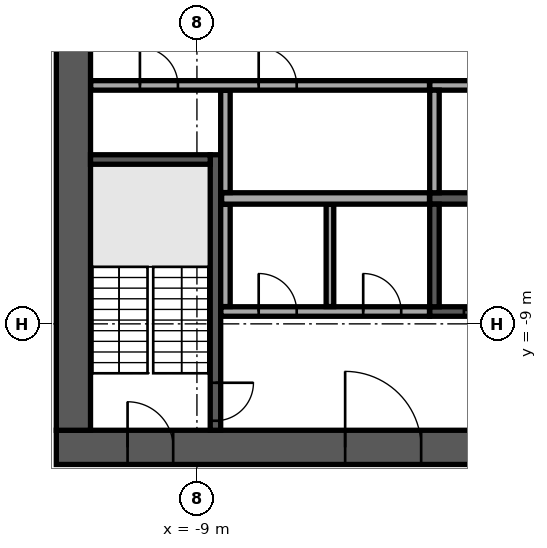
"""IFC4 building model, lengths in metres.
Left out: names, types, materials, properties, quantities, classifications, styles, units other than length and angle.
Written with IfcOpenShell. Run it as: python <this file> out.ifc"""

import sys

from ifc_helpers import new_model, si_unit, direction, frame, frame_2d, origin, place, context, subcontext, project, spatial, rectangle, extrude, element, fill, save


model = new_model("IFC4")
c1 = context("Model", 3, precision=1e-05, world=origin(), true_north=direction((0.0, 1.0)))
c2 = subcontext(c1, "Body", "Model", "MODEL_VIEW")
j1 = project(units=[si_unit("LENGTHUNIT", "METRE"), si_unit("PLANEANGLEUNIT", "RADIAN")], contexts=[c1])
p1 = place(None, origin())
s1 = spatial("IfcSite", under=j1, at=p1, CompositionType="ELEMENT")
p2 = place(p1, origin())
s2 = spatial("IfcBuilding", under=s1, at=p2, CompositionType="ELEMENT")
p3 = place(p2, frame((0.0, 0.0, 217.3)))
s3 = spatial("IfcBuildingStorey", under=s2, at=p3, CompositionType="ELEMENT", Elevation=217.3)
p4 = place(p3, frame((-12.7, -12.25, 0.0), z_axis=(0.0, 0.0, 1.0), x_axis=(1.0, 0.0, 0.0)))
e1 = element("IfcWall", 1, at=p4, inside=s3, PredefinedType="SHEAR", context=c2, shape_type="SweptSolid", body=[
    extrude(rectangle(XDim=25.4, YDim=0.9, at=frame_2d((12.7, 0.0))), origin(), (0.0, 0.0, 1.0), 3.62),
])
p5 = place(p4, frame((7.6, 0.0, 0.0)))
e2 = element("IfcOpeningElement", 2, at=p5, cuts=e1, PredefinedType="OPENING", context=c2, shape_type="SweptSolid", body=[
    extrude(rectangle(XDim=2.0, YDim=2.1, at=frame_2d((1.0, 1.05))), frame((0.0, 0.46, 0.0), z_axis=(0.0, -1.0, 0.0), x_axis=(1.0, 0.0, 0.0)), (0.0, 0.0, 1.0), 0.92),
])
p6 = place(p4, frame((17.725, 0.0, 0.0)))
e3 = element("IfcOpeningElement", 3, at=p6, cuts=e1, PredefinedType="OPENING", context=c2, shape_type="SweptSolid", body=[
    extrude(rectangle(XDim=1.2, YDim=2.1, at=frame_2d((0.6, 1.05))), frame((0.0, 0.46, 0.0), z_axis=(0.0, -1.0, 0.0), x_axis=(1.0, 0.0, 0.0)), (0.0, 0.0, 1.0), 0.92),
])
p7 = place(p4, frame((1.875, 0.0, 0.0)))
e4 = element("IfcOpeningElement", 4, at=p7, cuts=e1, PredefinedType="OPENING", context=c2, shape_type="SweptSolid", body=[
    extrude(rectangle(XDim=1.2, YDim=2.1, at=frame_2d((0.6, 1.05))), frame((0.0, 0.46, 0.0), z_axis=(0.0, -1.0, 0.0), x_axis=(1.0, 0.0, 0.0)), (0.0, 0.0, 1.0), 0.92),
])
p8 = place(p4, frame((22.325, 0.0, 0.0)))
e5 = element("IfcOpeningElement", 5, at=p8, cuts=e1, PredefinedType="OPENING", context=c2, shape_type="SweptSolid", body=[
    extrude(rectangle(XDim=1.2, YDim=2.1, at=frame_2d((0.6, 1.05))), frame((0.0, 0.46, 0.0), z_axis=(0.0, -1.0, 0.0), x_axis=(1.0, 0.0, 0.0)), (0.0, 0.0, 1.0), 0.92),
])
p9 = place(p3, frame((-12.25, -11.8, 0.0), z_axis=(0.0, 0.0, 1.0), x_axis=(0.0, 1.0, 0.0)))
e6 = element("IfcWall", 6, at=p9, inside=s3, PredefinedType="SHEAR", context=c2, shape_type="SweptSolid", body=[
    extrude(rectangle(XDim=23.6, YDim=0.9, at=frame_2d((11.8, 0.0))), origin(), (0.0, 0.0, 1.0), 3.62),
])
p10 = place(p9, frame((10.6, 0.0, 0.0)))
e7 = element("IfcOpeningElement", 7, at=p10, cuts=e6, PredefinedType="OPENING", context=c2, shape_type="SweptSolid", body=[
    extrude(rectangle(XDim=2.4, YDim=2.4, at=frame_2d((1.2, 1.2))), frame((0.0, 0.46, 0.0), z_axis=(0.0, -1.0, 0.0), x_axis=(1.0, 0.0, 0.0)), (0.0, 0.0, 1.0), 0.92),
])
p11 = place(p3, frame((-2.875, -5.7, 0.0), z_axis=(0.0, 0.0, 1.0), x_axis=(1.0, 0.0, 0.0)))
e8 = element("IfcWall", 8, at=p11, inside=s3, PredefinedType="SOLIDWALL", context=c2, shape_type="SweptSolid", body=[
    extrude(rectangle(XDim=11.25, YDim=0.3, at=frame_2d((5.625, 0.0))), origin(), (0.0, 0.0, 1.0), 3.62),
])
p12 = place(p3, frame((-2.875, -2.725, 0.0), z_axis=(0.0, 0.0, 1.0), x_axis=(1.0, 0.0, 0.0)))
e9 = element("IfcWall", 9, at=p12, inside=s3, PredefinedType="SOLIDWALL", context=c2, shape_type="SweptSolid", body=[
    extrude(rectangle(XDim=8.5, YDim=0.25, at=frame_2d((4.25, 0.0))), origin(), (0.0, 0.0, 1.0), 3.62),
])
p13 = place(p3, frame((-2.75, -5.55, 0.0), z_axis=(0.0, 0.0, 1.0), x_axis=(0.0, 1.0, 0.0)))
e10 = element("IfcWall", 10, at=p13, inside=s3, PredefinedType="SOLIDWALL", context=c2, shape_type="SweptSolid", body=[
    extrude(rectangle(XDim=2.7, YDim=0.25, at=frame_2d((1.35, 0.0))), origin(), (0.0, 0.0, 1.0), 3.62),
])
p14 = place(p3, frame((-2.875, -8.675, 0.0), z_axis=(0.0, 0.0, 1.0), x_axis=(1.0, 0.0, 0.0)))
e11 = element("IfcWall", 11, at=p14, inside=s3, PredefinedType="SOLIDWALL", context=c2, shape_type="SweptSolid", body=[
    extrude(rectangle(XDim=11.25, YDim=0.25, at=frame_2d((5.625, 0.0))), origin(), (0.0, 0.0, 1.0), 3.62),
])
p15 = place(p14, frame((0.9, 0.0, 0.0)))
e12 = element("IfcOpeningElement", 12, at=p15, cuts=e11, PredefinedType="OPENING", context=c2, shape_type="SweptSolid", body=[
    extrude(rectangle(XDim=1.2, YDim=2.1, at=frame_2d((0.6, 1.05))), frame((0.0, 0.135, 0.0), z_axis=(0.0, -1.0, 0.0), x_axis=(1.0, 0.0, 0.0)), (0.0, 0.0, 1.0), 0.27),
])
p16 = place(p14, frame((3.65, 0.0, 0.0)))
e13 = element("IfcOpeningElement", 13, at=p16, cuts=e11, PredefinedType="OPENING", context=c2, shape_type="SweptSolid", body=[
    extrude(rectangle(XDim=1.2, YDim=2.1, at=frame_2d((0.6, 1.05))), frame((0.0, 0.135, 0.0), z_axis=(0.0, -1.0, 0.0), x_axis=(1.0, 0.0, 0.0)), (0.0, 0.0, 1.0), 0.27),
])
p17 = place(p14, frame((6.4, 0.0, 0.0)))
e14 = element("IfcOpeningElement", 14, at=p17, cuts=e11, PredefinedType="OPENING", context=c2, shape_type="SweptSolid", body=[
    extrude(rectangle(XDim=1.2, YDim=2.1, at=frame_2d((0.6, 1.05))), frame((0.0, 0.135, 0.0), z_axis=(0.0, -1.0, 0.0), x_axis=(1.0, 0.0, 0.0)), (0.0, 0.0, 1.0), 0.27),
])
p18 = place(p14, frame((9.15, 0.0, 0.0)))
e15 = element("IfcOpeningElement", 15, at=p18, cuts=e11, PredefinedType="OPENING", context=c2, shape_type="SweptSolid", body=[
    extrude(rectangle(XDim=1.2, YDim=2.1, at=frame_2d((0.6, 1.05))), frame((0.0, 0.135, 0.0), z_axis=(0.0, -1.0, 0.0), x_axis=(1.0, 0.0, 0.0)), (0.0, 0.0, 1.0), 0.27),
])
p19 = place(p3, frame((-2.75, -8.55, 0.0), z_axis=(0.0, 0.0, 1.0), x_axis=(0.0, 1.0, 0.0)))
e16 = element("IfcWall", 16, at=p19, inside=s3, PredefinedType="SOLIDWALL", context=c2, shape_type="SweptSolid", body=[
    extrude(rectangle(XDim=2.7, YDim=0.25, at=frame_2d((1.35, 0.0))), origin(), (0.0, 0.0, 1.0), 3.62),
])
p20 = place(p3, frame((-8.512, -4.55, 0.0), z_axis=(0.0, 0.0, 1.0), x_axis=(0.0, -1.0, 0.0)))
e17 = element("IfcWall", 17, at=p20, inside=s3, PredefinedType="SOLIDWALL", context=c2, shape_type="SweptSolid", body=[
    extrude(rectangle(XDim=7.25, YDim=0.275, at=frame_2d((3.625, 0.0))), origin(), (0.0, 0.0, 1.0), 3.62),
])
p21 = place(p20, frame((6.0, 0.0, 0.0)))
e18 = element("IfcOpeningElement", 18, at=p21, cuts=e17, PredefinedType="OPENING", context=c2, shape_type="SweptSolid", body=[
    extrude(rectangle(XDim=1.0, YDim=2.1, at=frame_2d((0.5, 1.05))), frame((0.0, 0.147, 0.0), z_axis=(0.0, -1.0, 0.0), x_axis=(1.0, 0.0, 0.0)), (0.0, 0.0, 1.0), 0.295),
])
p22 = place(p3, frame((-8.65, -4.675, 0.0), z_axis=(0.0, 0.0, 1.0), x_axis=(-1.0, 0.0, 0.0)))
e19 = element("IfcWall", 19, at=p22, inside=s3, PredefinedType="SOLIDWALL", context=c2, shape_type="SweptSolid", body=[
    extrude(rectangle(XDim=3.15, YDim=0.25, at=frame_2d((1.575, 0.0))), origin(), (0.0, 0.0, 1.0), 3.62),
])
p23 = place(p3, frame((-8.37, -8.675, 0.0), z_axis=(0.0, 0.0, 1.0), x_axis=(1.0, 0.0, 0.0)))
e20 = element("IfcWall", 20, at=p23, inside=s3, PredefinedType="PARTITIONING", context=c2, shape_type="SweptSolid", body=[
    extrude(rectangle(XDim=5.49, YDim=0.25, at=frame_2d((2.745, 0.0))), origin(), (0.0, 0.0, 1.0), 3.62),
])
p24 = place(p23, frame((0.995, 0.0, 0.0)))
e21 = element("IfcOpeningElement", 21, at=p24, cuts=e20, PredefinedType="OPENING", context=c2, shape_type="SweptSolid", body=[
    extrude(rectangle(XDim=1.0, YDim=2.1, at=frame_2d((0.5, 1.05))), frame((0.0, 0.135, 0.0), z_axis=(0.0, -1.0, 0.0), x_axis=(1.0, 0.0, 0.0)), (0.0, 0.0, 1.0), 0.27),
])
p25 = place(p23, frame((3.745, 0.0, 0.0)))
e22 = element("IfcOpeningElement", 22, at=p25, cuts=e20, PredefinedType="OPENING", context=c2, shape_type="SweptSolid", body=[
    extrude(rectangle(XDim=1.0, YDim=2.1, at=frame_2d((0.5, 1.05))), frame((0.0, 0.135, 0.0), z_axis=(0.0, -1.0, 0.0), x_axis=(1.0, 0.0, 0.0)), (0.0, 0.0, 1.0), 0.27),
])
p26 = place(p3, frame((-8.25, -8.545, 0.0), z_axis=(0.0, 0.0, 1.0), x_axis=(0.0, 1.0, 0.0)))
e23 = element("IfcWall", 23, at=p26, inside=s3, PredefinedType="PARTITIONING", context=c2, shape_type="SweptSolid", body=[
    extrude(rectangle(XDim=2.69, YDim=0.25, at=frame_2d((1.345, 0.0))), origin(), (0.0, 0.0, 1.0), 3.62),
])
p27 = place(p3, frame((-5.5, -8.545, 0.0), z_axis=(0.0, 0.0, 1.0), x_axis=(0.0, 1.0, 0.0)))
e24 = element("IfcWall", 24, at=p27, inside=s3, PredefinedType="PARTITIONING", context=c2, shape_type="SweptSolid", body=[
    extrude(rectangle(XDim=2.69, YDim=0.2, at=frame_2d((1.345, 0.0))), origin(), (0.0, 0.0, 1.0), 3.62),
])
p28 = place(p3, frame((-8.35, -5.7, 0.0), z_axis=(0.0, 0.0, 1.0), x_axis=(1.0, 0.0, 0.0)))
e25 = element("IfcWall", 25, at=p28, inside=s3, PredefinedType="PARTITIONING", context=c2, shape_type="SweptSolid", body=[
    extrude(rectangle(XDim=5.47, YDim=0.3, at=frame_2d((2.735, 0.0))), origin(), (0.0, 0.0, 1.0), 3.62),
])
p29 = place(p3, frame((-8.25, -5.545, 0.0), z_axis=(0.0, 0.0, 1.0), x_axis=(0.0, 1.0, 0.0)))
e26 = element("IfcWall", 26, at=p29, inside=s3, PredefinedType="PARTITIONING", context=c2, shape_type="SweptSolid", body=[
    extrude(rectangle(XDim=2.69, YDim=0.25, at=frame_2d((1.345, 0.0))), origin(), (0.0, 0.0, 1.0), 3.62),
])
p30 = place(p3, frame((-11.795, -2.725, 0.0), z_axis=(0.0, 0.0, 1.0), x_axis=(1.0, 0.0, 0.0)))
e27 = element("IfcWall", 27, at=p30, inside=s3, PredefinedType="PARTITIONING", context=c2, shape_type="SweptSolid", body=[
    extrude(rectangle(XDim=8.915, YDim=0.25, at=frame_2d((4.458, 0.0))), origin(), (0.0, 0.0, 1.0), 3.62),
])
p31 = place(p30, frame((1.295, 0.0, 0.0)))
e28 = element("IfcOpeningElement", 28, at=p31, cuts=e27, PredefinedType="OPENING", context=c2, shape_type="SweptSolid", body=[
    extrude(rectangle(XDim=1.0, YDim=2.1, at=frame_2d((0.5, 1.05))), frame((0.0, 0.135, 0.0), z_axis=(0.0, -1.0, 0.0), x_axis=(1.0, 0.0, 0.0)), (0.0, 0.0, 1.0), 0.27),
])
p32 = place(p30, frame((4.42, 0.0, 0.0)))
e29 = element("IfcOpeningElement", 29, at=p32, cuts=e27, PredefinedType="OPENING", context=c2, shape_type="SweptSolid", body=[
    extrude(rectangle(XDim=1.0, YDim=2.1, at=frame_2d((0.5, 1.05))), frame((0.0, 0.135, 0.0), z_axis=(0.0, -1.0, 0.0), x_axis=(1.0, 0.0, 0.0)), (0.0, 0.0, 1.0), 0.27),
])
p33 = place(p3, frame((-1.962, 34.735, 0.0), z_axis=(0.0, 0.0, 1.0), x_axis=(-0.669133181838, -0.743142506497, 0.0)))
e30 = element("IfcWall", 30, at=p33, inside=s3, PredefinedType="STANDARD", context=c2, shape_type="SweptSolid", body=[
    extrude(rectangle(XDim=49.0, YDim=0.6, at=frame_2d((24.5, 0.0))), origin(), (0.0, 0.0, 1.0), 3.62),
])
p34 = place(p33, frame((1.227, 0.0, 0.9)))
e31 = element("IfcOpeningElement", 31, at=p34, cuts=e30, PredefinedType="OPENING", context=c2, shape_type="SweptSolid", body=[
    extrude(rectangle(XDim=2.0, YDim=2.1, at=frame_2d((1.0, 1.05))), frame((0.0, 0.31, 0.0), z_axis=(0.0, -1.0, 0.0), x_axis=(1.0, 0.0, 0.0)), (0.0, 0.0, 1.0), 0.62),
])
p35 = place(p33, frame((5.682, 0.0, 0.9)))
e32 = element("IfcOpeningElement", 32, at=p35, cuts=e30, PredefinedType="OPENING", context=c2, shape_type="SweptSolid", body=[
    extrude(rectangle(XDim=2.0, YDim=2.1, at=frame_2d((1.0, 1.05))), frame((0.0, 0.31, 0.0), z_axis=(0.0, -1.0, 0.0), x_axis=(1.0, 0.0, 0.0)), (0.0, 0.0, 1.0), 0.62),
])
p36 = place(p33, frame((10.136, 0.0, 0.9)))
e33 = element("IfcOpeningElement", 33, at=p36, cuts=e30, PredefinedType="OPENING", context=c2, shape_type="SweptSolid", body=[
    extrude(rectangle(XDim=2.0, YDim=2.1, at=frame_2d((1.0, 1.05))), frame((0.0, 0.31, 0.0), z_axis=(0.0, -1.0, 0.0), x_axis=(1.0, 0.0, 0.0)), (0.0, 0.0, 1.0), 0.62),
])
p37 = place(p33, frame((14.591, 0.0, 0.9)))
e34 = element("IfcOpeningElement", 34, at=p37, cuts=e30, PredefinedType="OPENING", context=c2, shape_type="SweptSolid", body=[
    extrude(rectangle(XDim=2.0, YDim=2.1, at=frame_2d((1.0, 1.05))), frame((0.0, 0.31, 0.0), z_axis=(0.0, -1.0, 0.0), x_axis=(1.0, 0.0, 0.0)), (0.0, 0.0, 1.0), 0.62),
])
p38 = place(p33, frame((19.045, 0.0, 0.9)))
e35 = element("IfcOpeningElement", 35, at=p38, cuts=e30, PredefinedType="OPENING", context=c2, shape_type="SweptSolid", body=[
    extrude(rectangle(XDim=2.0, YDim=2.1, at=frame_2d((1.0, 1.05))), frame((0.0, 0.31, 0.0), z_axis=(0.0, -1.0, 0.0), x_axis=(1.0, 0.0, 0.0)), (0.0, 0.0, 1.0), 0.62),
])
p39 = place(p33, frame((23.5, 0.0, 0.9)))
e36 = element("IfcOpeningElement", 36, at=p39, cuts=e30, PredefinedType="OPENING", context=c2, shape_type="SweptSolid", body=[
    extrude(rectangle(XDim=2.0, YDim=2.1, at=frame_2d((1.0, 1.05))), frame((0.0, 0.31, 0.0), z_axis=(0.0, -1.0, 0.0), x_axis=(1.0, 0.0, 0.0)), (0.0, 0.0, 1.0), 0.62),
])
p40 = place(p33, frame((27.955, 0.0, 0.9)))
e37 = element("IfcOpeningElement", 37, at=p40, cuts=e30, PredefinedType="OPENING", context=c2, shape_type="SweptSolid", body=[
    extrude(rectangle(XDim=2.0, YDim=2.1, at=frame_2d((1.0, 1.05))), frame((0.0, 0.31, 0.0), z_axis=(0.0, -1.0, 0.0), x_axis=(1.0, 0.0, 0.0)), (0.0, 0.0, 1.0), 0.62),
])
p41 = place(p33, frame((32.409, 0.0, 0.9)))
e38 = element("IfcOpeningElement", 38, at=p41, cuts=e30, PredefinedType="OPENING", context=c2, shape_type="SweptSolid", body=[
    extrude(rectangle(XDim=2.0, YDim=2.1, at=frame_2d((1.0, 1.05))), frame((0.0, 0.31, 0.0), z_axis=(0.0, -1.0, 0.0), x_axis=(1.0, 0.0, 0.0)), (0.0, 0.0, 1.0), 0.62),
])
p42 = place(p33, frame((36.864, 0.0, 0.9)))
e39 = element("IfcOpeningElement", 39, at=p42, cuts=e30, PredefinedType="OPENING", context=c2, shape_type="SweptSolid", body=[
    extrude(rectangle(XDim=2.0, YDim=2.1, at=frame_2d((1.0, 1.05))), frame((0.0, 0.31, 0.0), z_axis=(0.0, -1.0, 0.0), x_axis=(1.0, 0.0, 0.0)), (0.0, 0.0, 1.0), 0.62),
])
p43 = place(p33, frame((41.318, 0.0, 0.9)))
e40 = element("IfcOpeningElement", 40, at=p43, cuts=e30, PredefinedType="OPENING", context=c2, shape_type="SweptSolid", body=[
    extrude(rectangle(XDim=2.0, YDim=2.1, at=frame_2d((1.0, 1.05))), frame((0.0, 0.31, 0.0), z_axis=(0.0, -1.0, 0.0), x_axis=(1.0, 0.0, 0.0)), (0.0, 0.0, 1.0), 0.62),
])
p44 = place(p33, frame((45.773, 0.0, 0.9)))
e41 = element("IfcOpeningElement", 41, at=p44, cuts=e30, PredefinedType="OPENING", context=c2, shape_type="SweptSolid", body=[
    extrude(rectangle(XDim=2.0, YDim=2.1, at=frame_2d((1.0, 1.05))), frame((0.0, 0.31, 0.0), z_axis=(0.0, -1.0, 0.0), x_axis=(1.0, 0.0, 0.0)), (0.0, 0.0, 1.0), 0.62),
])
p45 = place(p3, frame((-34.365, -9.023, 0.0), z_axis=(0.0, 0.0, 1.0), x_axis=(0.743146896498, -0.66912830625, 0.0)))
e42 = element("IfcWall", 42, at=p45, inside=s3, PredefinedType="STANDARD", context=c2, shape_type="SweptSolid", body=[
    extrude(rectangle(XDim=39.0, YDim=0.6, at=frame_2d((19.5, 0.0))), origin(), (0.0, 0.0, 1.0), 3.62),
])
p46 = place(p45, frame((1.217, 0.0, 0.9)))
e43 = element("IfcOpeningElement", 43, at=p46, cuts=e42, PredefinedType="OPENING", context=c2, shape_type="SweptSolid", body=[
    extrude(rectangle(XDim=1.9, YDim=2.1, at=frame_2d((0.95, 1.05))), frame((0.0, 0.31, 0.0), z_axis=(0.0, -1.0, 0.0), x_axis=(1.0, 0.0, 0.0)), (0.0, 0.0, 1.0), 0.62),
])
p47 = place(p45, frame((5.55, 0.0, 0.9)))
e44 = element("IfcOpeningElement", 44, at=p47, cuts=e42, PredefinedType="OPENING", context=c2, shape_type="SweptSolid", body=[
    extrude(rectangle(XDim=1.9, YDim=2.1, at=frame_2d((0.95, 1.05))), frame((0.0, 0.31, 0.0), z_axis=(0.0, -1.0, 0.0), x_axis=(1.0, 0.0, 0.0)), (0.0, 0.0, 1.0), 0.62),
])
p48 = place(p45, frame((9.883, 0.0, 0.9)))
e45 = element("IfcOpeningElement", 45, at=p48, cuts=e42, PredefinedType="OPENING", context=c2, shape_type="SweptSolid", body=[
    extrude(rectangle(XDim=1.9, YDim=2.1, at=frame_2d((0.95, 1.05))), frame((0.0, 0.31, 0.0), z_axis=(0.0, -1.0, 0.0), x_axis=(1.0, 0.0, 0.0)), (0.0, 0.0, 1.0), 0.62),
])
p49 = place(p45, frame((14.217, 0.0, 0.9)))
e46 = element("IfcOpeningElement", 46, at=p49, cuts=e42, PredefinedType="OPENING", context=c2, shape_type="SweptSolid", body=[
    extrude(rectangle(XDim=1.9, YDim=2.1, at=frame_2d((0.95, 1.05))), frame((0.0, 0.31, 0.0), z_axis=(0.0, -1.0, 0.0), x_axis=(1.0, 0.0, 0.0)), (0.0, 0.0, 1.0), 0.62),
])
p50 = place(p45, frame((18.55, 0.0, 0.9)))
e47 = element("IfcOpeningElement", 47, at=p50, cuts=e42, PredefinedType="OPENING", context=c2, shape_type="SweptSolid", body=[
    extrude(rectangle(XDim=1.9, YDim=2.1, at=frame_2d((0.95, 1.05))), frame((0.0, 0.31, 0.0), z_axis=(0.0, -1.0, 0.0), x_axis=(1.0, 0.0, 0.0)), (0.0, 0.0, 1.0), 0.62),
])
p51 = place(p45, frame((22.883, 0.0, 0.9)))
e48 = element("IfcOpeningElement", 48, at=p51, cuts=e42, PredefinedType="OPENING", context=c2, shape_type="SweptSolid", body=[
    extrude(rectangle(XDim=1.9, YDim=2.1, at=frame_2d((0.95, 1.05))), frame((0.0, 0.31, 0.0), z_axis=(0.0, -1.0, 0.0), x_axis=(1.0, 0.0, 0.0)), (0.0, 0.0, 1.0), 0.62),
])
p52 = place(p45, frame((27.217, 0.0, 0.9)))
e49 = element("IfcOpeningElement", 49, at=p52, cuts=e42, PredefinedType="OPENING", context=c2, shape_type="SweptSolid", body=[
    extrude(rectangle(XDim=1.9, YDim=2.1, at=frame_2d((0.95, 1.05))), frame((0.0, 0.31, 0.0), z_axis=(0.0, -1.0, 0.0), x_axis=(1.0, 0.0, 0.0)), (0.0, 0.0, 1.0), 0.62),
])
p53 = place(p45, frame((31.55, 0.0, 0.9)))
e50 = element("IfcOpeningElement", 50, at=p53, cuts=e42, PredefinedType="OPENING", context=c2, shape_type="SweptSolid", body=[
    extrude(rectangle(XDim=1.9, YDim=2.1, at=frame_2d((0.95, 1.05))), frame((0.0, 0.31, 0.0), z_axis=(0.0, -1.0, 0.0), x_axis=(1.0, 0.0, 0.0)), (0.0, 0.0, 1.0), 0.62),
])
p54 = place(p45, frame((35.883, 0.0, 0.9)))
e51 = element("IfcOpeningElement", 51, at=p54, cuts=e42, PredefinedType="OPENING", context=c2, shape_type="SweptSolid", body=[
    extrude(rectangle(XDim=1.9, YDim=2.1, at=frame_2d((0.95, 1.05))), frame((0.0, 0.31, 0.0), z_axis=(0.0, -1.0, 0.0), x_axis=(1.0, 0.0, 0.0)), (0.0, 0.0, 1.0), 0.62),
])
p55 = place(p3, frame((-24.285, -7.708, 0.0), z_axis=(0.0, 0.0, 1.0), x_axis=(0.743144813636, -0.66913061951, 0.0)))
e52 = element("IfcWall", 52, at=p55, inside=s3, PredefinedType="PARTITIONING", context=c2, shape_type="SweptSolid", body=[
    extrude(rectangle(XDim=25.854, YDim=0.15, at=frame_2d((12.927, 0.0))), origin(), (0.0, 0.0, 1.0), 3.17),
])
p56 = place(p55, frame((9.29, 0.0, 0.0)))
e53 = element("IfcOpeningElement", 53, at=p56, cuts=e52, PredefinedType="OPENING", context=c2, shape_type="SweptSolid", body=[
    extrude(rectangle(XDim=1.0, YDim=2.1, at=frame_2d((0.5, 1.05))), frame((0.0, 0.085, 0.0), z_axis=(0.0, -1.0, 0.0), x_axis=(1.0, 0.0, 0.0)), (0.0, 0.0, 1.0), 0.17),
])
p57 = place(p5, origin())
e54 = element("IfcDoor", 54, at=p57, inside=s3, OperationType="SINGLE_SWING_LEFT", PredefinedType="DOOR", context=c2, shape_type="SweptSolid", body=[
    extrude(rectangle(XDim=2.0, YDim=2.1, at=frame_2d((1.0, 1.05))), frame((0.0, 0.025, 0.0), z_axis=(0.0, -1.0, 0.0), x_axis=(1.0, 0.0, 0.0)), (0.0, 0.0, 1.0), 0.05),
])
fill(e2, e54)
p58 = place(p7, origin())
e55 = element("IfcDoor", 55, at=p58, inside=s3, OperationType="SINGLE_SWING_LEFT", PredefinedType="DOOR", context=c2, shape_type="SweptSolid", body=[
    extrude(rectangle(XDim=1.2, YDim=2.1, at=frame_2d((0.6, 1.05))), frame((0.0, 0.025, 0.0), z_axis=(0.0, -1.0, 0.0), x_axis=(1.0, 0.0, 0.0)), (0.0, 0.0, 1.0), 0.05),
])
fill(e4, e55)
p59 = place(p15, origin())
e56 = element("IfcDoor", 56, at=p59, inside=s3, OperationType="DOUBLE_DOOR_SLIDING", PredefinedType="DOOR", context=c2, shape_type="SweptSolid", body=[
    extrude(rectangle(XDim=1.2, YDim=2.1, at=frame_2d((0.6, 1.05))), frame((0.0, 0.025, 0.0), z_axis=(0.0, -1.0, 0.0), x_axis=(1.0, 0.0, 0.0)), (0.0, 0.0, 1.0), 0.05),
])
fill(e12, e56)
p60 = place(p21, origin())
e57 = element("IfcDoor", 57, at=p60, inside=s3, OperationType="SINGLE_SWING_LEFT", PredefinedType="DOOR", context=c2, shape_type="SweptSolid", body=[
    extrude(rectangle(XDim=1.0, YDim=2.1, at=frame_2d((0.5, 1.05))), frame((0.0, 0.025, 0.0), z_axis=(0.0, -1.0, 0.0), x_axis=(1.0, 0.0, 0.0)), (0.0, 0.0, 1.0), 0.05),
])
fill(e18, e57)
p61 = place(p24, origin())
e58 = element("IfcDoor", 58, at=p61, inside=s3, OperationType="SINGLE_SWING_RIGHT", PredefinedType="DOOR", context=c2, shape_type="SweptSolid", body=[
    extrude(rectangle(XDim=1.0, YDim=2.1, at=frame_2d((0.5, 1.05))), frame((0.0, 0.025, 0.0), z_axis=(0.0, -1.0, 0.0), x_axis=(1.0, 0.0, 0.0)), (0.0, 0.0, 1.0), 0.05),
])
fill(e21, e58)
p62 = place(p25, origin())
e59 = element("IfcDoor", 59, at=p62, inside=s3, OperationType="SINGLE_SWING_RIGHT", PredefinedType="DOOR", context=c2, shape_type="SweptSolid", body=[
    extrude(rectangle(XDim=1.0, YDim=2.1, at=frame_2d((0.5, 1.05))), frame((0.0, 0.025, 0.0), z_axis=(0.0, -1.0, 0.0), x_axis=(1.0, 0.0, 0.0)), (0.0, 0.0, 1.0), 0.05),
])
fill(e22, e59)
p63 = place(p31, origin())
e60 = element("IfcDoor", 60, at=p63, inside=s3, OperationType="SINGLE_SWING_RIGHT", PredefinedType="DOOR", context=c2, shape_type="SweptSolid", body=[
    extrude(rectangle(XDim=1.0, YDim=2.1, at=frame_2d((0.5, 1.05))), frame((0.0, 0.025, 0.0), z_axis=(0.0, -1.0, 0.0), x_axis=(1.0, 0.0, 0.0)), (0.0, 0.0, 1.0), 0.05),
])
fill(e28, e60)
p64 = place(p32, origin())
e61 = element("IfcDoor", 61, at=p64, inside=s3, OperationType="SINGLE_SWING_RIGHT", PredefinedType="DOOR", context=c2, shape_type="SweptSolid", body=[
    extrude(rectangle(XDim=1.0, YDim=2.1, at=frame_2d((0.5, 1.05))), frame((0.0, 0.025, 0.0), z_axis=(0.0, -1.0, 0.0), x_axis=(1.0, 0.0, 0.0)), (0.0, 0.0, 1.0), 0.05),
])
fill(e29, e61)
save(model, sys.argv[1])
